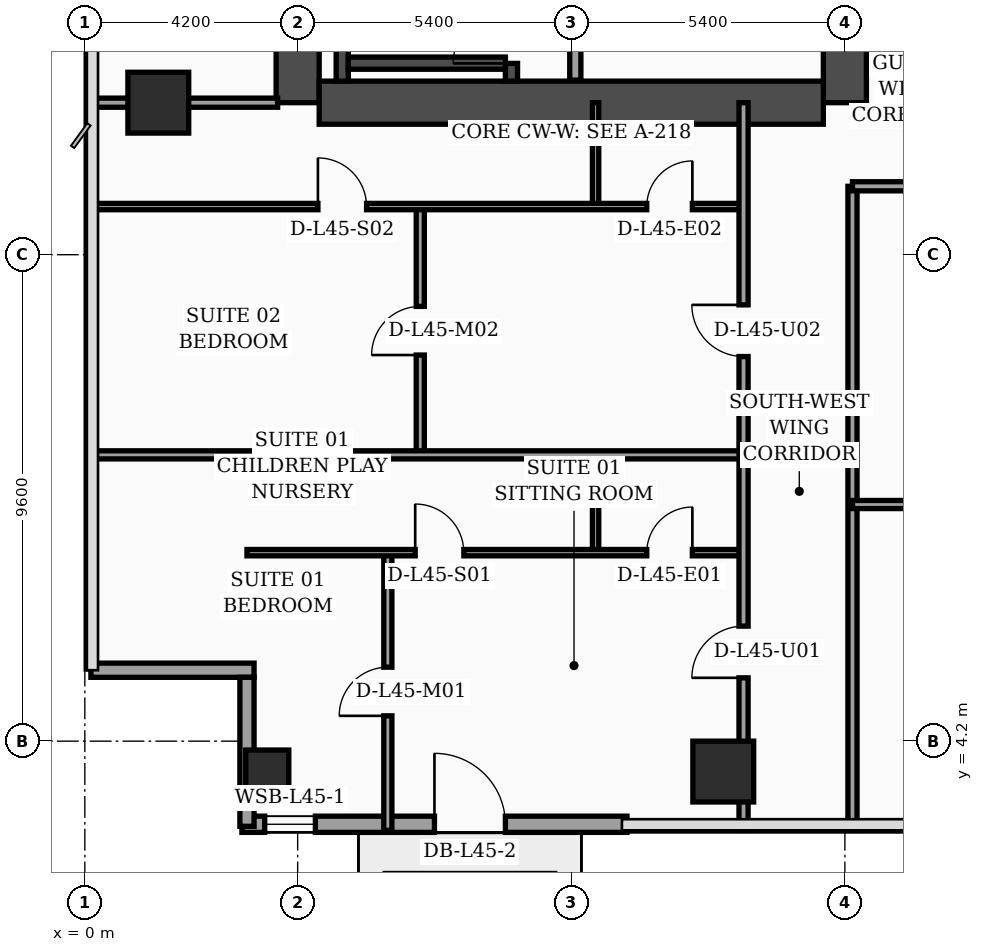
"""IFC4 building model, lengths in metres.
Left out: names, types, materials, properties, quantities, classifications, styles, units other than length and angle.
Written with IfcOpenShell. Run it as: python <this file> out.ifc"""

import sys

from ifc_helpers import new_model, si_unit, direction, frame, frame_2d, origin, origin_2d, place, context, subcontext, project, spatial, rectangle, hollow_rectangle, extrude, element, fill, save


model = new_model("IFC4")
c1 = context("Model", 3, precision=1e-05, world=origin(), true_north=direction((0.0, 1.0)))
c2 = subcontext(c1, "Body", "Model", "MODEL_VIEW")
j1 = project(units=[si_unit("LENGTHUNIT", "METRE"), si_unit("PLANEANGLEUNIT", "RADIAN")], contexts=[c1])
p1 = place(None, origin())
s1 = spatial("IfcSite", under=j1, at=p1, CompositionType="ELEMENT")
p2 = place(p1, origin())
s2 = spatial("IfcBuilding", under=s1, at=p2, CompositionType="ELEMENT")
p3 = place(p2, frame((0.0, 0.0, 182.7)))
s3 = spatial("IfcBuildingStorey", under=s2, at=p3, CompositionType="ELEMENT", Elevation=182.7)
p4 = place(p3, frame((4.2, 16.8, 0.0), z_axis=(0.0, 0.0, 1.0), x_axis=(0.0, 1.0, 0.0)))
e1 = element("IfcWall", 1, at=p4, inside=s3, PredefinedType="SHEAR", context=c2, shape_type="SweptSolid", body=[
    extrude(rectangle(XDim=21.6, YDim=0.85, at=frame_2d((10.8, 0.0))), origin(), (0.0, 0.0, 1.0), 3.52),
])
p5 = place(p3, frame((15.0, 16.8, 0.0), z_axis=(0.0, 0.0, 1.0), x_axis=(0.0, 1.0, 0.0)))
e2 = element("IfcWall", 2, at=p5, inside=s3, PredefinedType="SHEAR", context=c2, shape_type="SweptSolid", body=[
    extrude(rectangle(XDim=21.6, YDim=0.85, at=frame_2d((10.8, 0.0))), origin(), (0.0, 0.0, 1.0), 3.52),
])
p6 = place(p5, frame((8.65, 0.0, 0.0)))
e3 = element("IfcOpeningElement", 3, at=p6, cuts=e2, PredefinedType="OPENING", context=c2, shape_type="SweptSolid", body=[
    extrude(rectangle(XDim=1.1, YDim=2.2, at=frame_2d((0.55, 1.1))), frame((0.0, 0.435, 0.0), z_axis=(0.0, -1.0, 0.0), x_axis=(1.0, 0.0, 0.0)), (0.0, 0.0, 1.0), 0.87),
])
p7 = place(p5, frame((10.85, 0.0, 0.0)))
e4 = element("IfcOpeningElement", 4, at=p7, cuts=e2, PredefinedType="OPENING", context=c2, shape_type="SweptSolid", body=[
    extrude(rectangle(XDim=1.1, YDim=2.2, at=frame_2d((0.55, 1.1))), frame((0.0, 0.435, 0.0), z_axis=(0.0, -1.0, 0.0), x_axis=(1.0, 0.0, 0.0)), (0.0, 0.0, 1.0), 0.87),
])
p8 = place(p5, frame((13.5, 0.0, 0.0)))
e5 = element("IfcOpeningElement", 5, at=p8, cuts=e2, PredefinedType="OPENING", context=c2, shape_type="SweptSolid", body=[
    extrude(rectangle(XDim=1.1, YDim=2.2, at=frame_2d((0.55, 1.1))), frame((0.0, 0.435, 0.0), z_axis=(0.0, -1.0, 0.0), x_axis=(1.0, 0.0, 0.0)), (0.0, 0.0, 1.0), 0.87),
])
p9 = place(p5, frame((16.15, 0.0, 0.0)))
e6 = element("IfcOpeningElement", 6, at=p9, cuts=e2, PredefinedType="OPENING", context=c2, shape_type="SweptSolid", body=[
    extrude(rectangle(XDim=1.1, YDim=2.2, at=frame_2d((0.55, 1.1))), frame((0.0, 0.435, 0.0), z_axis=(0.0, -1.0, 0.0), x_axis=(1.0, 0.0, 0.0)), (0.0, 0.0, 1.0), 0.87),
])
p10 = place(p3, frame((4.625, 16.8, 0.0), z_axis=(0.0, 0.0, 1.0), x_axis=(1.0, 0.0, 0.0)))
e7 = element("IfcWall", 7, at=p10, inside=s3, PredefinedType="SHEAR", context=c2, shape_type="SweptSolid", body=[
    extrude(rectangle(XDim=9.95, YDim=0.85, at=frame_2d((4.975, 0.0))), origin(), (0.0, 0.0, 1.0), 3.52),
])
p11 = place(p3, frame((5.08, 17.225, 0.0), z_axis=(0.0, 0.0, 1.0), x_axis=(0.0, 1.0, 0.0)))
e8 = element("IfcWall", 8, at=p11, inside=s3, PredefinedType="SOLIDWALL", context=c2, shape_type="SweptSolid", body=[
    extrude(rectangle(XDim=9.565, YDim=0.24, at=frame_2d((4.782, 0.0))), origin(), (0.0, 0.0, 1.0), 3.52),
])
p12 = place(p3, frame((8.42, 17.225, 0.0), z_axis=(0.0, 0.0, 1.0), x_axis=(0.0, 1.0, 0.0)))
e9 = element("IfcWall", 9, at=p12, inside=s3, PredefinedType="SOLIDWALL", context=c2, shape_type="SweptSolid", body=[
    extrude(rectangle(XDim=9.565, YDim=0.24, at=frame_2d((4.782, 0.0))), origin(), (0.0, 0.0, 1.0), 3.52),
])
p13 = place(p12, frame((0.35, 0.0, 0.0)))
e10 = element("IfcOpeningElement", 10, at=p13, cuts=e9, PredefinedType="OPENING", context=c2, shape_type="SweptSolid", body=[
    extrude(rectangle(XDim=1.15, YDim=2.2, at=frame_2d((0.575, 1.1))), frame((0.0, 0.13, 0.0), z_axis=(0.0, -1.0, 0.0), x_axis=(1.0, 0.0, 0.0)), (0.0, 0.0, 1.0), 0.26),
])
p14 = place(p3, frame((5.2, 17.58, 0.0), z_axis=(0.0, 0.0, 1.0), x_axis=(1.0, 0.0, 0.0)))
e11 = element("IfcWall", 11, at=p14, inside=s3, PredefinedType="SOLIDWALL", context=c2, shape_type="SweptSolid", body=[
    extrude(rectangle(XDim=3.1, YDim=0.24, at=frame_2d((1.55, 0.0))), origin(), (0.0, 0.0, 1.0), 3.52),
])
p15 = place(p3, frame((3.6, 3.6, 0.0), z_axis=(0.0, 0.0, 1.0), x_axis=(1.0, 0.0, 0.0)))
e12 = element("IfcColumn", 12, at=p15, inside=s3, PredefinedType="COLUMN", context=c2, shape_type="SweptSolid", body=[
    extrude(hollow_rectangle(XDim=0.85, YDim=0.85, WallThickness=0.036, at=origin_2d()), origin(), (0.0, 0.0, 1.0), 3.52),
])
for number, where, z_axis, x_axis in (
    (13, (1.45, 16.8, 0.0), (0.0, 0.0, 1.0), (1.0, 0.0, 0.0)),
    (14, (12.6, 3.6, 0.0), (0.0, 0.0, 1.0), (1.0, 0.0, 0.0)),
):
    element("IfcColumn", number, at=place(p3, frame(where, z_axis=z_axis, x_axis=x_axis)), inside=s3, PredefinedType="COLUMN", context=c2, shape_type="SweptSolid", body=[
        extrude(rectangle(XDim=1.2, YDim=1.2, at=origin_2d()), origin(), (0.0, 0.0, 1.0), 3.52),
    ])
p16 = place(p3, frame((3.1, 2.56, 0.0), z_axis=(0.0, 0.0, 1.0), x_axis=(1.0, 0.0, 0.0)))
e15 = element("IfcWall", 15, at=p16, inside=s3, PredefinedType="SOLIDWALL", context=c2, shape_type="SweptSolid", body=[
    extrude(rectangle(XDim=7.6, YDim=0.32, at=frame_2d((3.8, 0.0))), origin(), (0.0, 0.0, 1.0), 3.52),
])
p17 = place(p16, frame((0.45, 0.0, 0.75)))
e16 = element("IfcOpeningElement", 16, at=p17, cuts=e15, PredefinedType="OPENING", context=c2, shape_type="SweptSolid", body=[
    extrude(rectangle(XDim=1.0, YDim=1.6, at=frame_2d((0.5, 0.8))), frame((0.0, 0.17, 0.0), z_axis=(0.0, -1.0, 0.0), x_axis=(1.0, 0.0, 0.0)), (0.0, 0.0, 1.0), 0.34),
])
p18 = place(p16, frame((3.8, 0.0, 0.0)))
e17 = element("IfcOpeningElement", 17, at=p18, cuts=e15, PredefinedType="OPENING", context=c2, shape_type="SweptSolid", body=[
    extrude(rectangle(XDim=1.4, YDim=2.25, at=frame_2d((0.7, 1.125))), frame((0.0, 0.17, 0.0), z_axis=(0.0, -1.0, 0.0), x_axis=(1.0, 0.0, 0.0)), (0.0, 0.0, 1.0), 0.34),
])
p19 = place(p3, frame((0.12, 5.6, 0.0), z_axis=(0.0, 0.0, 1.0), x_axis=(1.0, 0.0, 0.0)))
e18 = element("IfcWall", 18, at=p19, inside=s3, PredefinedType="SOLIDWALL", context=c2, shape_type="SweptSolid", body=[
    extrude(rectangle(XDim=3.22, YDim=0.28, at=frame_2d((1.61, 0.0))), origin(), (0.0, 0.0, 1.0), 2.92),
])
p20 = place(p3, frame((3.2, 5.46, 0.0), z_axis=(0.0, 0.0, 1.0), x_axis=(0.0, -1.0, 0.0)))
e19 = element("IfcWall", 19, at=p20, inside=s3, PredefinedType="SOLIDWALL", context=c2, shape_type="SweptSolid", body=[
    extrude(rectangle(XDim=2.94, YDim=0.28, at=frame_2d((1.47, 0.0))), origin(), (0.0, 0.0, 1.0), 2.92),
])
p21 = place(p3, frame((9.68, 17.245, 0.0), z_axis=(0.0, 0.0, 1.0), x_axis=(0.0, 1.0, 0.0)))
e20 = element("IfcWall", 20, at=p21, inside=s3, PredefinedType="SOLIDWALL", context=c2, shape_type="SweptSolid", body=[
    extrude(rectangle(XDim=7.755, YDim=0.22, at=frame_2d((3.877, 0.0))), origin(), (0.0, 0.0, 1.0), 3.52),
])
p22 = place(p3, frame((0.08, 16.8, 0.0), z_axis=(0.0, 0.0, 1.0), x_axis=(1.0, 0.0, 0.0)))
e21 = element("IfcWall", 21, at=p22, inside=s3, PredefinedType="PARTITIONING", context=c2, shape_type="SweptSolid", body=[
    extrude(rectangle(XDim=3.725, YDim=0.18, at=frame_2d((1.862, 0.0))), origin(), (0.0, 0.0, 1.0), 2.92),
])
p23 = place(p3, frame((10.08, 7.92, 0.0), z_axis=(0.0, 0.0, 1.0), x_axis=(0.0, 1.0, 0.0)))
e22 = element("IfcWall", 22, at=p23, inside=s3, PredefinedType="PARTITIONING", context=c2, shape_type="SweptSolid", body=[
    extrude(rectangle(XDim=1.93, YDim=0.125, at=frame_2d((0.965, 0.0))), origin(), (0.0, 0.0, 1.0), 3.52),
])
p24 = place(p3, frame((5.98, 2.44, 0.0), z_axis=(0.0, 0.0, 1.0), x_axis=(0.0, 1.0, 0.0)))
e23 = element("IfcWall", 23, at=p24, inside=s3, PredefinedType="PARTITIONING", context=c2, shape_type="SweptSolid", body=[
    extrude(rectangle(XDim=5.48, YDim=0.16, at=frame_2d((2.74, 0.0))), origin(), (0.0, 0.0, 1.0), 3.02),
])
p25 = place(p24, frame((2.26, 0.0, 0.0)))
e24 = element("IfcOpeningElement", 24, at=p25, cuts=e23, PredefinedType="OPENING", context=c2, shape_type="SweptSolid", body=[
    extrude(rectangle(XDim=0.96, YDim=2.2, at=frame_2d((0.48, 1.1))), frame((0.0, 0.09, 0.0), z_axis=(0.0, -1.0, 0.0), x_axis=(1.0, 0.0, 0.0)), (0.0, 0.0, 1.0), 0.18),
])
p26 = place(p3, frame((3.2, 7.92, 0.0), z_axis=(0.0, 0.0, 1.0), x_axis=(1.0, 0.0, 0.0)))
e25 = element("IfcWall", 25, at=p26, inside=s3, PredefinedType="PARTITIONING", context=c2, shape_type="SweptSolid", body=[
    extrude(rectangle(XDim=9.8, YDim=0.125, at=frame_2d((4.9, 0.0))), origin(), (0.0, 0.0, 1.0), 2.92),
])
p27 = place(p26, frame((3.32, 0.0, 0.0)))
e26 = element("IfcOpeningElement", 26, at=p27, cuts=e25, PredefinedType="OPENING", context=c2, shape_type="SweptSolid", body=[
    extrude(rectangle(XDim=0.96, YDim=2.2, at=frame_2d((0.48, 1.1))), frame((0.0, 0.073, 0.0), z_axis=(0.0, -1.0, 0.0), x_axis=(1.0, 0.0, 0.0)), (0.0, 0.0, 1.0), 0.145),
])
p28 = place(p26, frame((7.89, 0.0, 0.0)))
e27 = element("IfcOpeningElement", 27, at=p28, cuts=e25, PredefinedType="OPENING", context=c2, shape_type="SweptSolid", body=[
    extrude(rectangle(XDim=0.9, YDim=2.15, at=frame_2d((0.45, 1.075))), frame((0.0, 0.073, 0.0), z_axis=(0.0, -1.0, 0.0), x_axis=(1.0, 0.0, 0.0)), (0.0, 0.0, 1.0), 0.145),
])
p29 = place(p3, frame((10.08, 14.75, 0.0), z_axis=(0.0, 0.0, 1.0), x_axis=(0.0, 1.0, 0.0)))
e28 = element("IfcWall", 28, at=p29, inside=s3, PredefinedType="PARTITIONING", context=c2, shape_type="SweptSolid", body=[
    extrude(rectangle(XDim=2.05, YDim=0.125, at=frame_2d((1.025, 0.0))), origin(), (0.0, 0.0, 1.0), 3.52),
])
p30 = place(p3, frame((6.62, 9.85, 0.0), z_axis=(0.0, 0.0, 1.0), x_axis=(0.0, 1.0, 0.0)))
e29 = element("IfcWall", 29, at=p30, inside=s3, PredefinedType="PARTITIONING", context=c2, shape_type="SweptSolid", body=[
    extrude(rectangle(XDim=4.9, YDim=0.16, at=frame_2d((2.45, 0.0))), origin(), (0.0, 0.0, 1.0), 3.12),
])
p31 = place(p30, frame((1.97, 0.0, 0.0)))
e30 = element("IfcOpeningElement", 30, at=p31, cuts=e29, PredefinedType="OPENING", context=c2, shape_type="SweptSolid", body=[
    extrude(rectangle(XDim=0.96, YDim=2.2, at=frame_2d((0.48, 1.1))), frame((0.0, 0.09, 0.0), z_axis=(0.0, -1.0, 0.0), x_axis=(1.0, 0.0, 0.0)), (0.0, 0.0, 1.0), 0.18),
])
p32 = place(p3, frame((0.08, 14.75, 0.0), z_axis=(0.0, 0.0, 1.0), x_axis=(1.0, 0.0, 0.0)))
e31 = element("IfcWall", 31, at=p32, inside=s3, PredefinedType="PARTITIONING", context=c2, shape_type="SweptSolid", body=[
    extrude(rectangle(XDim=12.92, YDim=0.125, at=frame_2d((6.46, 0.0))), origin(), (0.0, 0.0, 1.0), 2.92),
])
p33 = place(p32, frame((4.52, 0.0, 0.0)))
e32 = element("IfcOpeningElement", 32, at=p33, cuts=e31, PredefinedType="OPENING", context=c2, shape_type="SweptSolid", body=[
    extrude(rectangle(XDim=0.96, YDim=2.2, at=frame_2d((0.48, 1.1))), frame((0.0, 0.073, 0.0), z_axis=(0.0, -1.0, 0.0), x_axis=(1.0, 0.0, 0.0)), (0.0, 0.0, 1.0), 0.145),
])
p34 = place(p32, frame((11.01, 0.0, 0.0)))
e33 = element("IfcOpeningElement", 33, at=p34, cuts=e31, PredefinedType="OPENING", context=c2, shape_type="SweptSolid", body=[
    extrude(rectangle(XDim=0.9, YDim=2.15, at=frame_2d((0.45, 1.075))), frame((0.0, 0.073, 0.0), z_axis=(0.0, -1.0, 0.0), x_axis=(1.0, 0.0, 0.0)), (0.0, 0.0, 1.0), 0.145),
])
p35 = place(p3, frame((0.08, 9.85, 0.0), z_axis=(0.0, 0.0, 1.0), x_axis=(1.0, 0.0, 0.0)))
e34 = element("IfcWall", 34, at=p35, inside=s3, PredefinedType="PARTITIONING", context=c2, shape_type="SweptSolid", body=[
    extrude(rectangle(XDim=12.92, YDim=0.16, at=frame_2d((6.46, 0.0))), origin(), (0.0, 0.0, 1.0), 2.92),
])
p36 = place(p3, frame((13.0, 2.44, 0.0), z_axis=(0.0, 0.0, 1.0), x_axis=(0.0, 1.0, 0.0)))
e35 = element("IfcWall", 35, at=p36, inside=s3, PredefinedType="PARTITIONING", context=c2, shape_type="SweptSolid", body=[
    extrude(rectangle(XDim=14.36, YDim=0.18, at=frame_2d((7.18, 0.0))), origin(), (0.0, 0.0, 1.0), 2.92),
])
p37 = place(p36, frame((3.01, 0.0, 0.0)))
e36 = element("IfcOpeningElement", 36, at=p37, cuts=e35, PredefinedType="OPENING", context=c2, shape_type="SweptSolid", body=[
    extrude(rectangle(XDim=1.02, YDim=2.2, at=frame_2d((0.51, 1.1))), frame((0.0, 0.1, 0.0), z_axis=(0.0, -1.0, 0.0), x_axis=(1.0, 0.0, 0.0)), (0.0, 0.0, 1.0), 0.2),
])
p38 = place(p36, frame((9.35, 0.0, 0.0)))
e37 = element("IfcOpeningElement", 37, at=p38, cuts=e35, PredefinedType="OPENING", context=c2, shape_type="SweptSolid", body=[
    extrude(rectangle(XDim=1.02, YDim=2.2, at=frame_2d((0.51, 1.1))), frame((0.0, 0.1, 0.0), z_axis=(0.0, -1.0, 0.0), x_axis=(1.0, 0.0, 0.0)), (0.0, 0.0, 1.0), 0.2),
])
p39 = place(p3, frame((15.15, 2.44, 0.0), z_axis=(0.0, 0.0, 1.0), x_axis=(0.0, 1.0, 0.0)))
e38 = element("IfcWall", 38, at=p39, inside=s3, PredefinedType="PARTITIONING", context=c2, shape_type="SweptSolid", body=[
    extrude(rectangle(XDim=12.71, YDim=0.18, at=frame_2d((6.355, 0.0))), origin(), (0.0, 0.0, 1.0), 3.02),
])
p40 = place(p3, frame((15.15, 8.87, 0.0), z_axis=(0.0, 0.0, 1.0), x_axis=(1.0, 0.0, 0.0)))
e39 = element("IfcWall", 39, at=p40, inside=s3, PredefinedType="PARTITIONING", context=c2, shape_type="SweptSolid", body=[
    extrude(rectangle(XDim=4.45, YDim=0.16, at=frame_2d((2.225, 0.0))), origin(), (0.0, 0.0, 1.0), 3.52),
])
p41 = place(p40, frame((1.75, 0.0, 0.0)))
e40 = element("IfcOpeningElement", 40, at=p41, cuts=e39, PredefinedType="OPENING", context=c2, shape_type="SweptSolid", body=[
    extrude(rectangle(XDim=0.96, YDim=2.2, at=frame_2d((0.48, 1.1))), frame((0.0, 0.09, 0.0), z_axis=(0.0, -1.0, 0.0), x_axis=(1.0, 0.0, 0.0)), (0.0, 0.0, 1.0), 0.18),
])
p42 = place(p3, frame((15.15, 15.15, 0.0), z_axis=(0.0, 0.0, 1.0), x_axis=(1.0, 0.0, 0.0)))
e41 = element("IfcWall", 41, at=p42, inside=s3, PredefinedType="PARTITIONING", context=c2, shape_type="SweptSolid", body=[
    extrude(rectangle(XDim=6.45, YDim=0.18, at=frame_2d((3.225, 0.0))), origin(), (0.0, 0.0, 1.0), 2.47),
])
p43 = place(p42, frame((1.74, 0.0, 0.0)))
e42 = element("IfcOpeningElement", 42, at=p43, cuts=e41, PredefinedType="OPENING", context=c2, shape_type="SweptSolid", body=[
    extrude(rectangle(XDim=1.02, YDim=2.2, at=frame_2d((0.51, 1.1))), frame((0.0, 0.1, 0.0), z_axis=(0.0, -1.0, 0.0), x_axis=(1.0, 0.0, 0.0)), (0.0, 0.0, 1.0), 0.2),
])
p44 = place(p17, origin())
e43 = element("IfcWindow", 43, at=p44, inside=s3, PartitioningType="SINGLE_PANEL", PredefinedType="WINDOW", context=c2, shape_type="SweptSolid", body=[
    extrude(rectangle(XDim=1.0, YDim=1.6, at=frame_2d((0.5, 0.8))), frame((0.0, 0.03, 0.0), z_axis=(0.0, -1.0, 0.0), x_axis=(1.0, 0.0, 0.0)), (0.0, 0.0, 1.0), 0.06),
])
fill(e16, e43)
p45 = place(p18, origin())
e44 = element("IfcDoor", 44, at=p45, inside=s3, OperationType="SINGLE_SWING_LEFT", PredefinedType="DOOR", context=c2, shape_type="SweptSolid", body=[
    extrude(rectangle(XDim=1.4, YDim=2.25, at=frame_2d((0.7, 1.125))), frame((0.0, 0.025, 0.0), z_axis=(0.0, -1.0, 0.0), x_axis=(1.0, 0.0, 0.0)), (0.0, 0.0, 1.0), 0.05),
])
fill(e17, e44)
p46 = place(p25, origin())
e45 = element("IfcDoor", 45, at=p46, inside=s3, OperationType="SINGLE_SWING_LEFT", PredefinedType="DOOR", context=c2, shape_type="SweptSolid", body=[
    extrude(rectangle(XDim=0.96, YDim=2.2, at=frame_2d((0.48, 1.1))), frame((0.0, 0.025, 0.0), z_axis=(0.0, -1.0, 0.0), x_axis=(1.0, 0.0, 0.0)), (0.0, 0.0, 1.0), 0.05),
])
fill(e24, e45)
p47 = place(p27, origin())
e46 = element("IfcDoor", 46, at=p47, inside=s3, OperationType="SINGLE_SWING_LEFT", PredefinedType="DOOR", context=c2, shape_type="SweptSolid", body=[
    extrude(rectangle(XDim=0.96, YDim=2.2, at=frame_2d((0.48, 1.1))), frame((0.0, 0.025, 0.0), z_axis=(0.0, -1.0, 0.0), x_axis=(1.0, 0.0, 0.0)), (0.0, 0.0, 1.0), 0.05),
])
fill(e26, e46)
p48 = place(p28, origin())
e47 = element("IfcDoor", 47, at=p48, inside=s3, OperationType="SINGLE_SWING_RIGHT", PredefinedType="DOOR", context=c2, shape_type="SweptSolid", body=[
    extrude(rectangle(XDim=0.9, YDim=2.15, at=frame_2d((0.45, 1.075))), frame((0.0, 0.025, 0.0), z_axis=(0.0, -1.0, 0.0), x_axis=(1.0, 0.0, 0.0)), (0.0, 0.0, 1.0), 0.05),
])
fill(e27, e47)
p49 = place(p31, origin())
e48 = element("IfcDoor", 48, at=p49, inside=s3, OperationType="SINGLE_SWING_LEFT", PredefinedType="DOOR", context=c2, shape_type="SweptSolid", body=[
    extrude(rectangle(XDim=0.96, YDim=2.2, at=frame_2d((0.48, 1.1))), frame((0.0, 0.025, 0.0), z_axis=(0.0, -1.0, 0.0), x_axis=(1.0, 0.0, 0.0)), (0.0, 0.0, 1.0), 0.05),
])
fill(e30, e48)
p50 = place(p33, origin())
e49 = element("IfcDoor", 49, at=p50, inside=s3, OperationType="SINGLE_SWING_LEFT", PredefinedType="DOOR", context=c2, shape_type="SweptSolid", body=[
    extrude(rectangle(XDim=0.96, YDim=2.2, at=frame_2d((0.48, 1.1))), frame((0.0, 0.025, 0.0), z_axis=(0.0, -1.0, 0.0), x_axis=(1.0, 0.0, 0.0)), (0.0, 0.0, 1.0), 0.05),
])
fill(e32, e49)
p51 = place(p34, origin())
e50 = element("IfcDoor", 50, at=p51, inside=s3, OperationType="SINGLE_SWING_RIGHT", PredefinedType="DOOR", context=c2, shape_type="SweptSolid", body=[
    extrude(rectangle(XDim=0.9, YDim=2.15, at=frame_2d((0.45, 1.075))), frame((0.0, 0.025, 0.0), z_axis=(0.0, -1.0, 0.0), x_axis=(1.0, 0.0, 0.0)), (0.0, 0.0, 1.0), 0.05),
])
fill(e33, e50)
p52 = place(p37, origin())
e51 = element("IfcDoor", 51, at=p52, inside=s3, OperationType="SINGLE_SWING_LEFT", PredefinedType="DOOR", context=c2, shape_type="SweptSolid", body=[
    extrude(rectangle(XDim=1.02, YDim=2.2, at=frame_2d((0.51, 1.1))), frame((0.0, 0.025, 0.0), z_axis=(0.0, -1.0, 0.0), x_axis=(1.0, 0.0, 0.0)), (0.0, 0.0, 1.0), 0.05),
])
fill(e36, e51)
p53 = place(p38, origin())
e52 = element("IfcDoor", 52, at=p53, inside=s3, OperationType="SINGLE_SWING_RIGHT", PredefinedType="DOOR", context=c2, shape_type="SweptSolid", body=[
    extrude(rectangle(XDim=1.02, YDim=2.2, at=frame_2d((0.51, 1.1))), frame((0.0, 0.025, 0.0), z_axis=(0.0, -1.0, 0.0), x_axis=(1.0, 0.0, 0.0)), (0.0, 0.0, 1.0), 0.05),
])
fill(e37, e52)
p54 = place(p13, origin())
e53 = element("IfcDoor", 53, at=p54, inside=s3, OperationType="SINGLE_SWING_LEFT", PredefinedType="DOOR", context=c2, shape_type="SweptSolid", body=[
    extrude(rectangle(XDim=1.15, YDim=2.2, at=frame_2d((0.575, 1.1))), frame((0.0, 0.025, 0.0), z_axis=(0.0, -1.0, 0.0), x_axis=(1.0, 0.0, 0.0)), (0.0, 0.0, 1.0), 0.05),
])
fill(e10, e53)
save(model, sys.argv[1])
